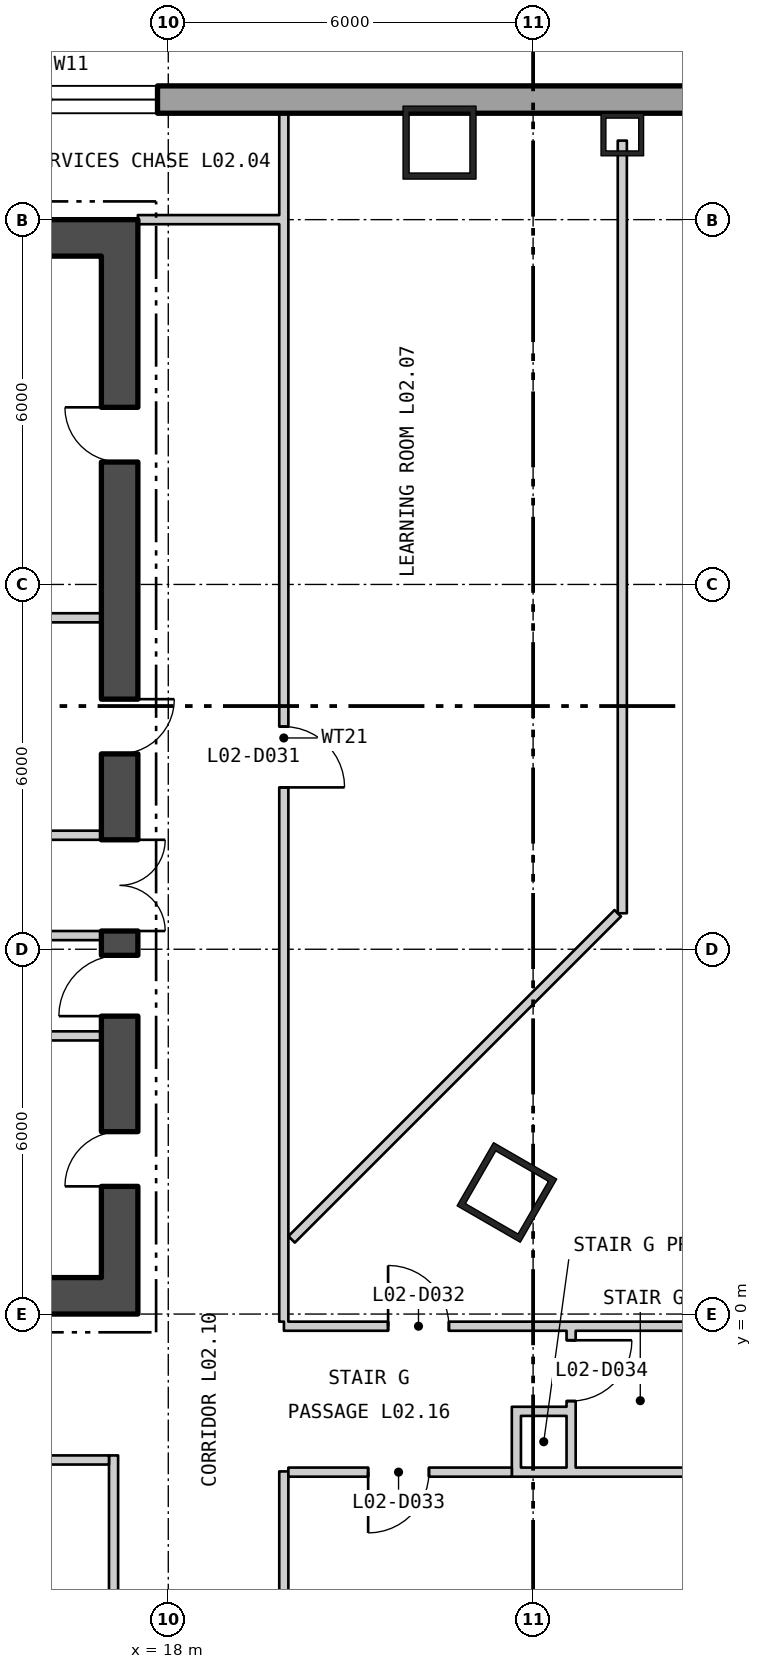
"""IFC4 building model, lengths in metres.
Left out: names, types, materials, properties, quantities, classifications, styles, units other than length and angle.
Written with IfcOpenShell. Run it as: python <this file> out.ifc"""

import sys

from ifc_helpers import new_model, si_unit, direction, frame, frame_2d, origin, origin_2d, place, context, subcontext, project, spatial, polyline, rectangle, hollow_rectangle, outline, extrude, element, fill, save


model = new_model("IFC4")
c1 = context("Model", 3, precision=1e-05, world=origin(), true_north=direction((0.0, 1.0)))
c2 = subcontext(c1, "Body", "Model", "MODEL_VIEW")
j1 = project(units=[si_unit("LENGTHUNIT", "METRE"), si_unit("PLANEANGLEUNIT", "RADIAN")], contexts=[c1])
p1 = place(None, origin())
s1 = spatial("IfcSite", under=j1, at=p1, CompositionType="ELEMENT")
p2 = place(p1, origin())
s2 = spatial("IfcBuilding", under=s1, at=p2, CompositionType="ELEMENT")
p3 = place(p2, frame((0.0, 0.0, 13.5)))
s3 = spatial("IfcBuildingStorey", under=s2, at=p3, CompositionType="ELEMENT", Elevation=13.5)
for number, where, z_axis, x_axis in (
    (1, (22.461, 19.267, 0.0), (0.0, 0.0, 1.0), (-1.0, 0.0, 0.0)),
    (2, (23.569, 2.0, 0.0), (0.0, 0.0, 1.0), (0.5, 0.866, 0.0)),
):
    element("IfcColumn", number, at=place(p3, frame(where, z_axis=z_axis, x_axis=x_axis)), inside=s3, PredefinedType="COLUMN", context=c2, shape_type="SweptSolid", body=[
        extrude(hollow_rectangle(XDim=1.2, YDim=1.2, WallThickness=0.1, at=origin_2d()), origin(), (0.0, 0.0, 1.0), 5.1),
    ])
p4 = place(p3, frame((25.467, 19.4, 0.0), z_axis=(0.0, 0.0, 1.0), x_axis=(-1.0, 0.0, 0.0)))
e3 = element("IfcColumn", 3, at=p4, inside=s3, PredefinedType="COLUMN", context=c2, shape_type="SweptSolid", body=[
    extrude(hollow_rectangle(XDim=0.7, YDim=0.7, WallThickness=0.08, at=origin_2d()), origin(), (0.0, 0.0, 1.0), 5.1),
])
p5 = place(p3, frame((38.775, 19.975, -0.4), z_axis=(0.0, 0.0, 1.0), x_axis=(-1.0, 0.0, 0.0)))
e4 = element("IfcWall", 4, at=p5, inside=s3, PredefinedType="SOLIDWALL", context=c2, shape_type="SweptSolid", body=[
    extrude(outline(polyline([(-0.225, -0.225), (77.775, -0.225), (77.325, 0.225), (0.225, 0.225), (-0.225, -0.225)])), origin(), (0.0, 0.0, 1.0), 5.1),
])
p6 = place(p5, frame((1.958, 0.0, 1.3)))
e5 = element("IfcOpeningElement", 5, at=p6, cuts=e4, PredefinedType="OPENING", context=c2, shape_type="SweptSolid", body=[
    extrude(rectangle(XDim=3.6, YDim=3.2, at=frame_2d((1.8, 1.6))), frame((0.0, 0.235, 0.0), z_axis=(0.0, -1.0, 0.0), x_axis=(1.0, 0.0, 0.0)), (0.0, 0.0, 1.0), 0.47),
])
p7 = place(p5, frame((8.325, 0.0, 1.3)))
e6 = element("IfcOpeningElement", 6, at=p7, cuts=e4, PredefinedType="OPENING", context=c2, shape_type="SweptSolid", body=[
    extrude(rectangle(XDim=3.6, YDim=3.2, at=frame_2d((1.8, 1.6))), frame((0.0, 0.235, 0.0), z_axis=(0.0, -1.0, 0.0), x_axis=(1.0, 0.0, 0.0)), (0.0, 0.0, 1.0), 0.47),
])
p8 = place(p5, frame((20.952, 0.0, 1.3)))
e7 = element("IfcOpeningElement", 7, at=p8, cuts=e4, PredefinedType="OPENING", context=c2, shape_type="SweptSolid", body=[
    extrude(rectangle(XDim=3.6, YDim=3.2, at=frame_2d((1.8, 1.6))), frame((0.0, 0.235, 0.0), z_axis=(0.0, -1.0, 0.0), x_axis=(1.0, 0.0, 0.0)), (0.0, 0.0, 1.0), 0.47),
])
p9 = place(p5, frame((27.425, 0.0, 1.3)))
e8 = element("IfcOpeningElement", 8, at=p9, cuts=e4, PredefinedType="OPENING", context=c2, shape_type="SweptSolid", body=[
    extrude(rectangle(XDim=3.6, YDim=3.2, at=frame_2d((1.8, 1.6))), frame((0.0, 0.235, 0.0), z_axis=(0.0, -1.0, 0.0), x_axis=(1.0, 0.0, 0.0)), (0.0, 0.0, 1.0), 0.47),
])
p10 = place(p5, frame((46.525, 0.0, 1.3)))
e9 = element("IfcOpeningElement", 9, at=p10, cuts=e4, PredefinedType="OPENING", context=c2, shape_type="SweptSolid", body=[
    extrude(rectangle(XDim=3.6, YDim=3.2, at=frame_2d((1.8, 1.6))), frame((0.0, 0.235, 0.0), z_axis=(0.0, -1.0, 0.0), x_axis=(1.0, 0.0, 0.0)), (0.0, 0.0, 1.0), 0.47),
])
p11 = place(p5, frame((52.998, 0.0, 1.3)))
e10 = element("IfcOpeningElement", 10, at=p11, cuts=e4, PredefinedType="OPENING", context=c2, shape_type="SweptSolid", body=[
    extrude(rectangle(XDim=3.6, YDim=3.2, at=frame_2d((1.8, 1.6))), frame((0.0, 0.235, 0.0), z_axis=(0.0, -1.0, 0.0), x_axis=(1.0, 0.0, 0.0)), (0.0, 0.0, 1.0), 0.47),
])
p12 = place(p5, frame((65.625, 0.0, 1.3)))
e11 = element("IfcOpeningElement", 11, at=p12, cuts=e4, PredefinedType="OPENING", context=c2, shape_type="SweptSolid", body=[
    extrude(rectangle(XDim=3.6, YDim=3.2, at=frame_2d((1.8, 1.6))), frame((0.0, 0.235, 0.0), z_axis=(0.0, -1.0, 0.0), x_axis=(1.0, 0.0, 0.0)), (0.0, 0.0, 1.0), 0.47),
])
p13 = place(p5, frame((71.992, 0.0, 1.3)))
e12 = element("IfcOpeningElement", 12, at=p13, cuts=e4, PredefinedType="OPENING", context=c2, shape_type="SweptSolid", body=[
    extrude(rectangle(XDim=3.6, YDim=3.2, at=frame_2d((1.8, 1.6))), frame((0.0, 0.235, 0.0), z_axis=(0.0, -1.0, 0.0), x_axis=(1.0, 0.0, 0.0)), (0.0, 0.0, 1.0), 0.47),
])
p14 = place(p3, frame((-17.5, 0.3, 0.0), z_axis=(0.0, 0.0, 1.0), x_axis=(1.0, 0.0, 0.0)))
e13 = element("IfcWall", 13, at=p14, inside=s3, PredefinedType="SHEAR", context=c2, shape_type="SweptSolid", body=[
    extrude(rectangle(XDim=35.0, YDim=0.6, at=frame_2d((17.5, 0.0))), origin(), (0.0, 0.0, 1.0), 4.88),
])
p15 = place(p14, frame((12.0, 0.0, 0.0)))
e14 = element("IfcOpeningElement", 14, at=p15, cuts=e13, PredefinedType="OPENING", context=c2, shape_type="SweptSolid", body=[
    extrude(rectangle(XDim=1.8, YDim=2.4, at=frame_2d((0.9, 1.2))), frame((0.0, 0.31, 0.0), z_axis=(0.0, -1.0, 0.0), x_axis=(1.0, 0.0, 0.0)), (0.0, 0.0, 1.0), 0.62),
])
p16 = place(p14, frame((22.0, 0.0, 0.0)))
e15 = element("IfcOpeningElement", 15, at=p16, cuts=e13, PredefinedType="OPENING", context=c2, shape_type="SweptSolid", body=[
    extrude(rectangle(XDim=1.8, YDim=2.4, at=frame_2d((0.9, 1.2))), frame((0.0, 0.31, 0.0), z_axis=(0.0, -1.0, 0.0), x_axis=(1.0, 0.0, 0.0)), (0.0, 0.0, 1.0), 0.62),
])
p17 = place(p3, frame((-17.5, 17.7, 0.0), z_axis=(0.0, 0.0, 1.0), x_axis=(1.0, 0.0, 0.0)))
e16 = element("IfcWall", 16, at=p17, inside=s3, PredefinedType="SHEAR", context=c2, shape_type="SweptSolid", body=[
    extrude(rectangle(XDim=35.0, YDim=0.6, at=frame_2d((17.5, 0.0))), origin(), (0.0, 0.0, 1.0), 4.88),
])
p18 = place(p3, frame((17.2, 0.6, 0.0), z_axis=(0.0, 0.0, 1.0), x_axis=(0.0, 1.0, 0.0)))
e17 = element("IfcWall", 17, at=p18, inside=s3, PredefinedType="SHEAR", context=c2, shape_type="SweptSolid", body=[
    extrude(rectangle(XDim=16.8, YDim=0.6, at=frame_2d((8.4, 0.0))), origin(), (0.0, 0.0, 1.0), 4.88),
])
p19 = place(p18, frame((5.7, 0.0, 0.0)))
e18 = element("IfcOpeningElement", 18, at=p19, cuts=e17, PredefinedType="OPENING", context=c2, shape_type="SweptSolid", body=[
    extrude(rectangle(XDim=1.5, YDim=2.1, at=frame_2d((0.75, 1.05))), frame((0.0, 0.31, 0.0), z_axis=(0.0, -1.0, 0.0), x_axis=(1.0, 0.0, 0.0)), (0.0, 0.0, 1.0), 0.62),
])
p20 = place(p18, frame((1.5, 0.0, 0.0)))
e19 = element("IfcOpeningElement", 19, at=p20, cuts=e17, PredefinedType="OPENING", context=c2, shape_type="SweptSolid", body=[
    extrude(rectangle(XDim=0.9, YDim=2.1, at=frame_2d((0.45, 1.05))), frame((0.0, 0.31, 0.0), z_axis=(0.0, -1.0, 0.0), x_axis=(1.0, 0.0, 0.0)), (0.0, 0.0, 1.0), 0.62),
])
p21 = place(p18, frame((4.3, 0.0, 0.0)))
e20 = element("IfcOpeningElement", 20, at=p21, cuts=e17, PredefinedType="OPENING", context=c2, shape_type="SweptSolid", body=[
    extrude(rectangle(XDim=1.0, YDim=2.1, at=frame_2d((0.5, 1.05))), frame((0.0, 0.31, 0.0), z_axis=(0.0, -1.0, 0.0), x_axis=(1.0, 0.0, 0.0)), (0.0, 0.0, 1.0), 0.62),
])
p22 = place(p18, frame((8.613, 0.0, 0.0)))
e21 = element("IfcOpeningElement", 21, at=p22, cuts=e17, PredefinedType="OPENING", context=c2, shape_type="SweptSolid", body=[
    extrude(rectangle(XDim=0.9, YDim=2.1, at=frame_2d((0.45, 1.05))), frame((0.0, 0.31, 0.0), z_axis=(0.0, -1.0, 0.0), x_axis=(1.0, 0.0, 0.0)), (0.0, 0.0, 1.0), 0.62),
])
p23 = place(p18, frame((13.413, 0.0, 0.0)))
e22 = element("IfcOpeningElement", 22, at=p23, cuts=e17, PredefinedType="OPENING", context=c2, shape_type="SweptSolid", body=[
    extrude(rectangle(XDim=0.9, YDim=2.1, at=frame_2d((0.45, 1.05))), frame((0.0, 0.31, 0.0), z_axis=(0.0, -1.0, 0.0), x_axis=(1.0, 0.0, 0.0)), (0.0, 0.0, 1.0), 0.62),
])
for number, where, z_axis, x_axis in (
    (23, (14.5, 6.225, 0.0), (0.0, 0.0, 1.0), (1.0, 0.0, 0.0)),
    (24, (14.5, 7.875, 0.0), (0.0, 0.0, 1.0), (1.0, 0.0, 0.0)),
    (25, (14.5, 4.575, 0.0), (0.0, 0.0, 1.0), (1.0, 0.0, 0.0)),
    (26, (14.5, 11.451, 0.0), (0.0, 0.0, 1.0), (1.0, 0.0, 0.0)),
):
    element("IfcWall", number, at=place(p3, frame(where, z_axis=z_axis, x_axis=x_axis)), inside=s3, PredefinedType="PARTITIONING", context=c2, shape_type="SweptSolid", body=[
        extrude(rectangle(XDim=2.4, YDim=0.15, at=frame_2d((1.2, 0.0))), origin(), (0.0, 0.0, 1.0), 4.88),
    ])
p24 = place(p3, frame((9.075, -2.4, 0.0), z_axis=(0.0, 0.0, 1.0), x_axis=(1.0, 0.0, 0.0)))
e27 = element("IfcWall", 27, at=p24, inside=s3, PredefinedType="PARTITIONING", context=c2, shape_type="SweptSolid", body=[
    extrude(rectangle(XDim=7.95, YDim=0.15, at=frame_2d((3.975, 0.0))), origin(), (0.0, 0.0, 1.0), 4.88),
])
p25 = place(p24, frame((1.303, 0.0, 0.0)))
e28 = element("IfcOpeningElement", 28, at=p25, cuts=e27, PredefinedType="OPENING", context=c2, shape_type="SweptSolid", body=[
    extrude(rectangle(XDim=1.0, YDim=2.1, at=frame_2d((0.5, 1.05))), frame((0.0, 0.085, 0.0), z_axis=(0.0, -1.0, 0.0), x_axis=(1.0, 0.0, 0.0)), (0.0, 0.0, 1.0), 0.17),
])
p26 = place(p24, frame((5.279, 0.0, 0.0)))
e29 = element("IfcOpeningElement", 29, at=p26, cuts=e27, PredefinedType="OPENING", context=c2, shape_type="SweptSolid", body=[
    extrude(rectangle(XDim=1.0, YDim=2.1, at=frame_2d((0.5, 1.05))), frame((0.0, 0.085, 0.0), z_axis=(0.0, -1.0, 0.0), x_axis=(1.0, 0.0, 0.0)), (0.0, 0.0, 1.0), 0.17),
])
p27 = place(p3, frame((17.1, -11.9, 0.0), z_axis=(0.0, 0.0, 1.0), x_axis=(0.0, 1.0, 0.0)))
e30 = element("IfcWall", 30, at=p27, inside=s3, PredefinedType="PARTITIONING", context=c2, shape_type="SweptSolid", body=[
    extrude(rectangle(XDim=9.575, YDim=0.15, at=frame_2d((4.787, 0.0))), origin(), (0.0, 0.0, 1.0), 4.88),
])
p28 = place(p27, frame((2.0, 0.0, 0.0)))
e31 = element("IfcOpeningElement", 31, at=p28, cuts=e30, PredefinedType="OPENING", context=c2, shape_type="SweptSolid", body=[
    extrude(rectangle(XDim=1.0, YDim=2.1, at=frame_2d((0.5, 1.05))), frame((0.0, 0.085, 0.0), z_axis=(0.0, -1.0, 0.0), x_axis=(1.0, 0.0, 0.0)), (0.0, 0.0, 1.0), 0.17),
])
p29 = place(p3, frame((17.5, 18.0, 0.0), z_axis=(0.0, 0.0, 1.0), x_axis=(1.0, 0.0, 0.0)))
e32 = element("IfcWall", 32, at=p29, inside=s3, PredefinedType="PARTITIONING", context=c2, shape_type="SweptSolid", body=[
    extrude(rectangle(XDim=2.475, YDim=0.15, at=frame_2d((1.238, 0.0))), origin(), (0.0, 0.0, 1.0), 4.33),
])
p30 = place(p3, frame((19.9, -23.775, 0.0), z_axis=(0.0, 0.0, 1.0), x_axis=(0.0, 1.0, 0.0)))
e33 = element("IfcWall", 33, at=p30, inside=s3, PredefinedType="PARTITIONING", context=c2, shape_type="SweptSolid", body=[
    extrude(rectangle(XDim=21.187, YDim=0.15, at=frame_2d((10.594, 0.0))), origin(), (0.0, 0.0, 1.0), 4.88),
])
p31 = place(p30, frame((2.643, 0.0, 0.0)))
e34 = element("IfcOpeningElement", 34, at=p31, cuts=e33, PredefinedType="OPENING", context=c2, shape_type="SweptSolid", body=[
    extrude(rectangle(XDim=1.8, YDim=2.1, at=frame_2d((0.9, 1.05))), frame((0.0, 0.085, 0.0), z_axis=(0.0, -1.0, 0.0), x_axis=(1.0, 0.0, 0.0)), (0.0, 0.0, 1.0), 0.17),
])
p32 = place(p30, frame((11.998, 0.0, 0.0)))
e35 = element("IfcOpeningElement", 35, at=p32, cuts=e33, PredefinedType="OPENING", context=c2, shape_type="SweptSolid", body=[
    extrude(rectangle(XDim=1.8, YDim=2.1, at=frame_2d((0.9, 1.05))), frame((0.0, 0.085, 0.0), z_axis=(0.0, -1.0, 0.0), x_axis=(1.0, 0.0, 0.0)), (0.0, 0.0, 1.0), 0.17),
])
p33 = place(p3, frame((19.9, -0.125, 0.0), z_axis=(0.0, 0.0, 1.0), x_axis=(0.0, 1.0, 0.0)))
e36 = element("IfcWall", 36, at=p33, inside=s3, PredefinedType="PARTITIONING", context=c2, shape_type="SweptSolid", body=[
    extrude(rectangle(XDim=1.15, YDim=0.15, at=frame_2d((0.575, 0.0))), origin(), (0.0, 0.0, 1.0), 4.88),
])
p34 = place(p3, frame((19.9, 1.025, 0.0), z_axis=(0.0, 0.0, 1.0), x_axis=(0.0, 1.0, 0.0)))
e37 = element("IfcWall", 37, at=p34, inside=s3, PredefinedType="PARTITIONING", context=c2, shape_type="SweptSolid", body=[
    extrude(rectangle(XDim=16.9, YDim=0.15, at=frame_2d((8.45, 0.0))), origin(), (0.0, 0.0, 1.0), 4.88),
])
p35 = place(p34, frame((7.637, 0.0, 0.0)))
e38 = element("IfcOpeningElement", 38, at=p35, cuts=e37, PredefinedType="OPENING", context=c2, shape_type="SweptSolid", body=[
    extrude(rectangle(XDim=1.0, YDim=2.1, at=frame_2d((0.5, 1.05))), frame((0.0, 0.085, 0.0), z_axis=(0.0, -1.0, 0.0), x_axis=(1.0, 0.0, 0.0)), (0.0, 0.0, 1.0), 0.17),
])
p36 = place(p3, frame((19.9, 18.075, 0.0), z_axis=(0.0, 0.0, 1.0), x_axis=(0.0, 1.0, 0.0)))
e39 = element("IfcWall", 39, at=p36, inside=s3, PredefinedType="PARTITIONING", context=c2, shape_type="SweptSolid", body=[
    extrude(rectangle(XDim=1.675, YDim=0.15, at=frame_2d((0.838, 0.0))), origin(), (0.0, 0.0, 1.0), 4.88),
])
p37 = place(p3, frame((19.902, -0.2, 0.0), z_axis=(0.0, 0.0, 1.0), x_axis=(1.0, 0.0, 0.0)))
e40 = element("IfcWall", 40, at=p37, inside=s3, PredefinedType="PARTITIONING", context=c2, shape_type="SweptSolid", body=[
    extrude(rectangle(XDim=6.848, YDim=0.15, at=frame_2d((3.424, 0.0))), origin(), (0.0, 0.0, 1.0), 4.88),
])
p38 = place(p37, frame((1.713, 0.0, 0.0)))
e41 = element("IfcOpeningElement", 41, at=p38, cuts=e40, PredefinedType="OPENING", context=c2, shape_type="SweptSolid", body=[
    extrude(rectangle(XDim=1.0, YDim=2.1, at=frame_2d((0.5, 1.05))), frame((0.0, 0.085, 0.0), z_axis=(0.0, -1.0, 0.0), x_axis=(1.0, 0.0, 0.0)), (0.0, 0.0, 1.0), 0.17),
])
p39 = place(p3, frame((19.975, -2.6, 0.0), z_axis=(0.0, 0.0, 1.0), x_axis=(1.0, 0.0, 0.0)))
e42 = element("IfcWall", 42, at=p39, inside=s3, PredefinedType="PARTITIONING", context=c2, shape_type="SweptSolid", body=[
    extrude(rectangle(XDim=3.675, YDim=0.15, at=frame_2d((1.837, 0.0))), origin(), (0.0, 0.0, 1.0), 4.88),
])
p40 = place(p39, frame((1.312, 0.0, 0.0)))
e43 = element("IfcOpeningElement", 43, at=p40, cuts=e42, PredefinedType="OPENING", context=c2, shape_type="SweptSolid", body=[
    extrude(rectangle(XDim=1.0, YDim=2.1, at=frame_2d((0.5, 1.05))), frame((0.0, 0.085, 0.0), z_axis=(0.0, -1.0, 0.0), x_axis=(1.0, 0.0, 0.0)), (0.0, 0.0, 1.0), 0.17),
])
p41 = place(p3, frame((20.028, 1.228, 0.0), z_axis=(0.0, 0.0, 1.0), x_axis=(0.707106781187, 0.707106781187, 0.0)))
e44 = element("IfcWall", 44, at=p41, inside=s3, PredefinedType="PARTITIONING", context=c2, shape_type="SweptSolid", body=[
    extrude(rectangle(XDim=7.586, YDim=0.15, at=frame_2d((3.793, 0.0))), origin(), (0.0, 0.0, 1.0), 4.88),
])
p42 = place(p3, frame((23.725, -2.675, 0.0), z_axis=(0.0, 0.0, 1.0), x_axis=(0.0, 1.0, 0.0)))
e45 = element("IfcWall", 45, at=p42, inside=s3, PredefinedType="PARTITIONING", context=c2, shape_type="SweptSolid", body=[
    extrude(rectangle(XDim=1.15, YDim=0.15, at=frame_2d((0.575, 0.0))), origin(), (0.0, 0.0, 1.0), 4.88),
])
for number, where, z_axis, x_axis in (
    (46, (23.8, -2.6, 0.0), (0.0, 0.0, 1.0), (1.0, 0.0, 0.0)),
    (47, (23.8, -1.6, 0.0), (0.0, 0.0, 1.0), (1.0, 0.0, 0.0)),
):
    element("IfcWall", number, at=place(p3, frame(where, z_axis=z_axis, x_axis=x_axis)), inside=s3, PredefinedType="PARTITIONING", context=c2, shape_type="SweptSolid", body=[
        extrude(rectangle(XDim=0.75, YDim=0.15, at=frame_2d((0.375, 0.0))), origin(), (0.0, 0.0, 1.0), 4.88),
    ])
p43 = place(p3, frame((24.625, -2.675, 0.0), z_axis=(0.0, 0.0, 1.0), x_axis=(0.0, 1.0, 0.0)))
e48 = element("IfcWall", 48, at=p43, inside=s3, PredefinedType="PARTITIONING", context=c2, shape_type="SweptSolid", body=[
    extrude(rectangle(XDim=1.087, YDim=0.15, at=frame_2d((0.543, 0.0))), origin(), (0.0, 0.0, 1.0), 4.88),
])
p44 = place(p3, frame((24.625, -1.588, 0.0), z_axis=(0.0, 0.0, 1.0), x_axis=(0.0, 1.0, 0.0)))
e49 = element("IfcWall", 49, at=p44, inside=s3, PredefinedType="PARTITIONING", context=c2, shape_type="SweptSolid", body=[
    extrude(rectangle(XDim=1.313, YDim=0.15, at=frame_2d((0.656, 0.0))), origin(), (0.0, 0.0, 1.0), 4.88),
])
p45 = place(p44, frame((0.157, 0.0, 0.0)))
e50 = element("IfcOpeningElement", 50, at=p45, cuts=e49, PredefinedType="OPENING", context=c2, shape_type="SweptSolid", body=[
    extrude(rectangle(XDim=1.0, YDim=2.1, at=frame_2d((0.5, 1.05))), frame((0.0, 0.085, 0.0), z_axis=(0.0, -1.0, 0.0), x_axis=(1.0, 0.0, 0.0)), (0.0, 0.0, 1.0), 0.17),
])
p46 = place(p3, frame((24.7, -2.6, 0.0), z_axis=(0.0, 0.0, 1.0), x_axis=(1.0, 0.0, 0.0)))
e51 = element("IfcWall", 51, at=p46, inside=s3, PredefinedType="PARTITIONING", context=c2, shape_type="SweptSolid", body=[
    extrude(rectangle(XDim=2.05, YDim=0.15, at=frame_2d((1.025, 0.0))), origin(), (0.0, 0.0, 1.0), 4.88),
])
p47 = place(p3, frame((25.467, 6.592, 0.0), z_axis=(0.0, 0.0, 1.0), x_axis=(0.0, 1.0, 0.0)))
e52 = element("IfcWall", 52, at=p47, inside=s3, PredefinedType="PARTITIONING", context=c2, shape_type="SweptSolid", body=[
    extrude(rectangle(XDim=7.736, YDim=0.15, at=frame_2d((3.868, 0.0))), origin(), (0.0, 0.0, 1.0), 4.88),
])
p48 = place(p3, frame((25.467, 14.328, 0.0), z_axis=(0.0, 0.0, 1.0), x_axis=(0.0, 1.0, 0.0)))
e53 = element("IfcWall", 53, at=p48, inside=s3, PredefinedType="PARTITIONING", context=c2, shape_type="SweptSolid", body=[
    extrude(rectangle(XDim=4.972, YDim=0.15, at=frame_2d((2.486, 0.0))), origin(), (0.0, 0.0, 1.0), 4.28),
])
p49 = place(p8, origin())
e54 = element("IfcWindow", 54, at=p49, inside=s3, PartitioningType="SINGLE_PANEL", PredefinedType="WINDOW", context=c2, shape_type="SweptSolid", body=[
    extrude(rectangle(XDim=3.6, YDim=3.2, at=frame_2d((1.8, 1.6))), frame((0.0, 0.105, 0.0), z_axis=(0.0, -1.0, 0.0), x_axis=(1.0, 0.0, 0.0)), (0.0, 0.0, 1.0), 0.06),
])
fill(e7, e54)
p50 = place(p19, origin())
e55 = element("IfcDoor", 55, at=p50, inside=s3, OperationType="DOUBLE_DOOR_SINGLE_SWING", PredefinedType="DOOR", context=c2, shape_type="SweptSolid", body=[
    extrude(rectangle(XDim=1.5, YDim=2.1, at=frame_2d((0.75, 1.05))), frame((0.0, 0.025, 0.0), z_axis=(0.0, -1.0, 0.0), x_axis=(1.0, 0.0, 0.0)), (0.0, 0.0, 1.0), 0.05),
])
fill(e18, e55)
p51 = place(p20, origin())
e56 = element("IfcDoor", 56, at=p51, inside=s3, OperationType="SINGLE_SWING_RIGHT", PredefinedType="DOOR", context=c2, shape_type="SweptSolid", body=[
    extrude(rectangle(XDim=0.9, YDim=2.1, at=frame_2d((0.45, 1.05))), frame((0.0, 0.025, 0.0), z_axis=(0.0, -1.0, 0.0), x_axis=(1.0, 0.0, 0.0)), (0.0, 0.0, 1.0), 0.05),
])
fill(e19, e56)
p52 = place(p21, origin())
e57 = element("IfcDoor", 57, at=p52, inside=s3, OperationType="SINGLE_SWING_RIGHT", PredefinedType="DOOR", context=c2, shape_type="SweptSolid", body=[
    extrude(rectangle(XDim=1.0, YDim=2.1, at=frame_2d((0.5, 1.05))), frame((0.0, 0.025, 0.0), z_axis=(0.0, -1.0, 0.0), x_axis=(1.0, 0.0, 0.0)), (0.0, 0.0, 1.0), 0.05),
])
fill(e20, e57)
p53 = place(p22, origin())
e58 = element("IfcDoor", 58, at=p53, inside=s3, OperationType="SINGLE_SWING_RIGHT", PredefinedType="DOOR", context=c2, shape_type="SweptSolid", body=[
    extrude(rectangle(XDim=0.9, YDim=2.1, at=frame_2d((0.45, 1.05))), frame((0.0, 0.025, 0.0), z_axis=(0.0, -1.0, 0.0), x_axis=(1.0, 0.0, 0.0)), (0.0, 0.0, 1.0), 0.05),
])
fill(e21, e58)
p54 = place(p23, origin())
e59 = element("IfcDoor", 59, at=p54, inside=s3, OperationType="SINGLE_SWING_LEFT", PredefinedType="DOOR", context=c2, shape_type="SweptSolid", body=[
    extrude(rectangle(XDim=0.9, YDim=2.1, at=frame_2d((0.45, 1.05))), frame((0.0, 0.025, 0.0), z_axis=(0.0, -1.0, 0.0), x_axis=(1.0, 0.0, 0.0)), (0.0, 0.0, 1.0), 0.05),
])
fill(e22, e59)
p55 = place(p35, origin())
e60 = element("IfcDoor", 60, at=p55, inside=s3, OperationType="SINGLE_SWING_LEFT", PredefinedType="DOOR", context=c2, shape_type="SweptSolid", body=[
    extrude(rectangle(XDim=1.0, YDim=2.1, at=frame_2d((0.5, 1.05))), frame((0.0, 0.025, 0.0), z_axis=(0.0, -1.0, 0.0), x_axis=(1.0, 0.0, 0.0)), (0.0, 0.0, 1.0), 0.05),
])
fill(e38, e60)
p56 = place(p38, origin())
e61 = element("IfcDoor", 61, at=p56, inside=s3, OperationType="SINGLE_SWING_RIGHT", PredefinedType="DOOR", context=c2, shape_type="SweptSolid", body=[
    extrude(rectangle(XDim=1.0, YDim=2.1, at=frame_2d((0.5, 1.05))), frame((0.0, 0.025, 0.0), z_axis=(0.0, -1.0, 0.0), x_axis=(1.0, 0.0, 0.0)), (0.0, 0.0, 1.0), 0.05),
])
fill(e41, e61)
p57 = place(p40, origin())
e62 = element("IfcDoor", 62, at=p57, inside=s3, OperationType="SINGLE_SWING_LEFT", PredefinedType="DOOR", context=c2, shape_type="SweptSolid", body=[
    extrude(rectangle(XDim=1.0, YDim=2.1, at=frame_2d((0.5, 1.05))), frame((0.0, 0.025, 0.0), z_axis=(0.0, -1.0, 0.0), x_axis=(1.0, 0.0, 0.0)), (0.0, 0.0, 1.0), 0.05),
])
fill(e43, e62)
p58 = place(p45, origin())
e63 = element("IfcDoor", 63, at=p58, inside=s3, OperationType="SINGLE_SWING_RIGHT", PredefinedType="DOOR", context=c2, shape_type="SweptSolid", body=[
    extrude(rectangle(XDim=1.0, YDim=2.1, at=frame_2d((0.5, 1.05))), frame((0.0, 0.025, 0.0), z_axis=(0.0, -1.0, 0.0), x_axis=(1.0, 0.0, 0.0)), (0.0, 0.0, 1.0), 0.05),
])
fill(e50, e63)
save(model, sys.argv[1])
